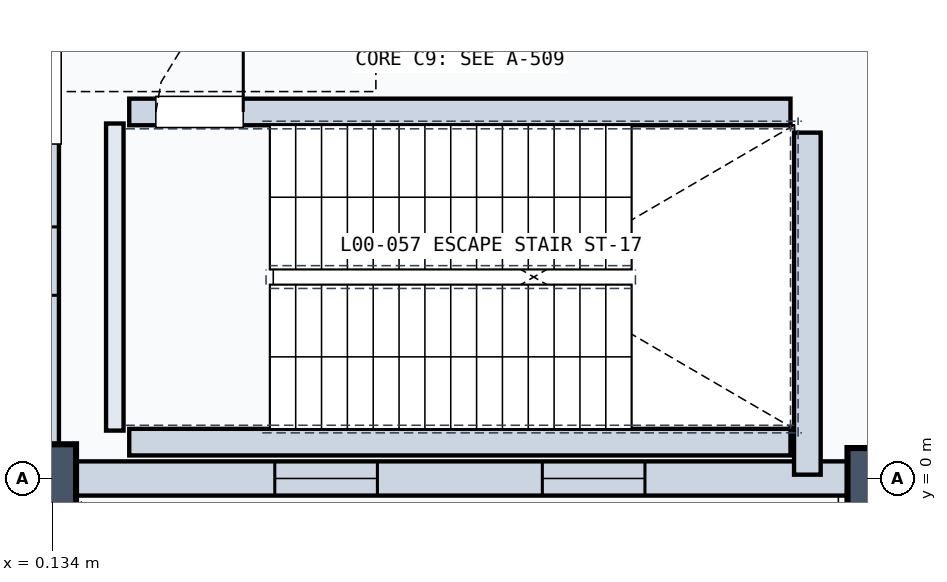
"""IFC4 building model, lengths in metres.
Left out: names, types, materials, properties, quantities, classifications, styles, units other than length and angle.
Written with IfcOpenShell. Run it as: python <this file> out.ifc"""

import sys

from ifc_helpers import new_model, si_unit, direction, frame, frame_2d, origin, origin_with_axes, origin_2d, place, context, subcontext, project, spatial, rectangle, circle, extrude, element, fill, save


model = new_model("IFC4")
c1 = context("Model", 3, precision=1e-05, world=origin(), true_north=direction((0.0, 1.0)))
c2 = subcontext(c1, "Body", "Model", "MODEL_VIEW")
j1 = project(units=[si_unit("LENGTHUNIT", "METRE"), si_unit("PLANEANGLEUNIT", "RADIAN")], contexts=[c1])
p1 = place(None, origin())
s1 = spatial("IfcSite", under=j1, at=p1, CompositionType="ELEMENT")
p2 = place(p1, origin())
s2 = spatial("IfcBuilding", under=s1, at=p2, CompositionType="ELEMENT")
p3 = place(p2, origin())
s3 = spatial("IfcBuildingStorey", under=s2, at=p3, CompositionType="ELEMENT", Elevation=0.0)
p4 = place(p3, origin_with_axes())
e1 = element("IfcColumn", 1, at=p4, inside=s3, PredefinedType="COLUMN", context=c2, shape_type="SweptSolid", body=[
    extrude(circle(Radius=0.45, at=origin_2d()), origin(), (0.0, 0.0, 1.0), 5.4),
])
p5 = place(p3, frame((11.0, 0.0, 0.0), z_axis=(0.0, 0.0, 1.0), x_axis=(1.0, 0.0, 0.0)))
e2 = element("IfcColumn", 2, at=p5, inside=s3, PredefinedType="COLUMN", context=c2, shape_type="SweptSolid", body=[
    extrude(circle(Radius=0.4, at=origin_2d()), origin(), (0.0, 0.0, 1.0), 5.4),
])
p6 = place(p3, frame((0.22, 0.0, 0.0), z_axis=(0.0, 0.0, 1.0), x_axis=(1.0, 0.0, 0.0)))
e3 = element("IfcWall", 3, at=p6, inside=s3, PredefinedType="SOLIDWALL", context=c2, shape_type="SweptSolid", body=[
    extrude(rectangle(XDim=10.56, YDim=0.45, at=frame_2d((5.28, 0.0))), origin(), (0.0, 0.0, 1.0), 4.35),
])
p7 = place(p6, frame((2.845, 0.0, 0.8)))
e4 = element("IfcOpeningElement", 4, at=p7, cuts=e3, PredefinedType="OPENING", context=c2, shape_type="SweptSolid", body=[
    extrude(rectangle(XDim=1.35, YDim=2.1, at=frame_2d((0.675, 1.05))), frame((0.0, 0.235, 0.0), z_axis=(0.0, -1.0, 0.0), x_axis=(1.0, 0.0, 0.0)), (0.0, 0.0, 1.0), 0.47),
])
p8 = place(p6, frame((6.365, 0.0, 0.8)))
e5 = element("IfcOpeningElement", 5, at=p8, cuts=e3, PredefinedType="OPENING", context=c2, shape_type="SweptSolid", body=[
    extrude(rectangle(XDim=1.35, YDim=2.1, at=frame_2d((0.675, 1.05))), frame((0.0, 0.235, 0.0), z_axis=(0.0, -1.0, 0.0), x_axis=(1.0, 0.0, 0.0)), (0.0, 0.0, 1.0), 0.47),
])
p9 = place(p3, frame((0.0, 0.22, 0.0), z_axis=(0.0, 0.0, 1.0), x_axis=(0.0, 1.0, 0.0)))
e6 = element("IfcWall", 6, at=p9, inside=s3, PredefinedType="SOLIDWALL", context=c2, shape_type="SweptSolid", body=[
    extrude(rectangle(XDim=10.56, YDim=0.45, at=frame_2d((5.28, 0.0))), origin(), (0.0, 0.0, 1.0), 4.3),
])
p10 = place(p9, frame((4.18, 0.0, 0.0)))
e7 = element("IfcOpeningElement", 7, at=p10, cuts=e6, PredefinedType="OPENING", context=c2, shape_type="SweptSolid", body=[
    extrude(rectangle(XDim=2.2, YDim=2.35, at=frame_2d((1.1, 1.175))), frame((0.0, 0.235, 0.0), z_axis=(0.0, -1.0, 0.0), x_axis=(1.0, 0.0, 0.0)), (0.0, 0.0, 1.0), 0.47),
])
p11 = place(p9, frame((2.19, 0.0, 0.8)))
e8 = element("IfcOpeningElement", 8, at=p11, cuts=e6, PredefinedType="OPENING", context=c2, shape_type="SweptSolid", body=[
    extrude(rectangle(XDim=0.9, YDim=1.8, at=frame_2d((0.45, 0.9))), frame((0.0, 0.235, 0.0), z_axis=(0.0, -1.0, 0.0), x_axis=(1.0, 0.0, 0.0)), (0.0, 0.0, 1.0), 0.47),
])
p12 = place(p3, frame((0.96, 0.63, 0.0), z_axis=(0.0, 0.0, 1.0), x_axis=(0.0, 1.0, 0.0)))
e9 = element("IfcWall", 9, at=p12, inside=s3, PredefinedType="SOLIDWALL", context=c2, shape_type="SweptSolid", body=[
    extrude(rectangle(XDim=4.04, YDim=0.23, at=frame_2d((2.02, 0.0))), origin(), (0.0, 0.0, 1.0), 5.06),
])
p13 = place(p3, frame((10.072, 0.05, 0.0), z_axis=(0.0, 0.0, 1.0), x_axis=(0.0, 1.0, 0.0)))
e10 = element("IfcWall", 10, at=p13, inside=s3, PredefinedType="SOLIDWALL", context=c2, shape_type="SweptSolid", body=[
    extrude(rectangle(XDim=4.5, YDim=0.35, at=frame_2d((2.25, 0.0))), origin(), (0.0, 0.0, 1.0), 5.06),
])
p14 = place(p3, frame((1.15, 0.478, 0.0), z_axis=(0.0, 0.0, 1.0), x_axis=(1.0, 0.0, 0.0)))
e11 = element("IfcWall", 11, at=p14, inside=s3, PredefinedType="SOLIDWALL", context=c2, shape_type="SweptSolid", body=[
    extrude(rectangle(XDim=8.7, YDim=0.35, at=frame_2d((4.35, 0.0))), origin(), (0.0, 0.0, 1.0), 5.06),
])
p15 = place(p3, frame((1.15, 4.822, 0.0), z_axis=(0.0, 0.0, 1.0), x_axis=(1.0, 0.0, 0.0)))
e12 = element("IfcWall", 12, at=p15, inside=s3, PredefinedType="SOLIDWALL", context=c2, shape_type="SweptSolid", body=[
    extrude(rectangle(XDim=8.7, YDim=0.35, at=frame_2d((4.35, 0.0))), origin(), (0.0, 0.0, 1.0), 5.06),
])
p16 = place(p15, frame((0.35, 0.0, 0.0)))
e13 = element("IfcOpeningElement", 13, at=p16, cuts=e12, PredefinedType="OPENING", context=c2, shape_type="SweptSolid", body=[
    extrude(rectangle(XDim=1.15, YDim=2.2, at=frame_2d((0.575, 1.1))), frame((0.0, 0.185, 0.0), z_axis=(0.0, -1.0, 0.0), x_axis=(1.0, 0.0, 0.0)), (0.0, 0.0, 1.0), 0.37),
])
p17 = place(p7, origin())
e14 = element("IfcWindow", 14, at=p17, inside=s3, PartitioningType="SINGLE_PANEL", PredefinedType="WINDOW", context=c2, shape_type="SweptSolid", body=[
    extrude(rectangle(XDim=1.35, YDim=2.1, at=frame_2d((0.675, 1.05))), frame((0.0, 0.03, 0.0), z_axis=(0.0, -1.0, 0.0), x_axis=(1.0, 0.0, 0.0)), (0.0, 0.0, 1.0), 0.06),
])
fill(e4, e14)
p18 = place(p8, origin())
e15 = element("IfcWindow", 15, at=p18, inside=s3, PartitioningType="SINGLE_PANEL", PredefinedType="WINDOW", context=c2, shape_type="SweptSolid", body=[
    extrude(rectangle(XDim=1.35, YDim=2.1, at=frame_2d((0.675, 1.05))), frame((0.0, 0.03, 0.0), z_axis=(0.0, -1.0, 0.0), x_axis=(1.0, 0.0, 0.0)), (0.0, 0.0, 1.0), 0.06),
])
fill(e5, e15)
p19 = place(p16, origin())
e16 = element("IfcDoor", 16, at=p19, inside=s3, OperationType="SINGLE_SWING_RIGHT", PredefinedType="DOOR", context=c2, shape_type="SweptSolid", body=[
    extrude(rectangle(XDim=1.15, YDim=2.2, at=frame_2d((0.575, 1.1))), frame((0.0, 0.025, 0.0), z_axis=(0.0, -1.0, 0.0), x_axis=(1.0, 0.0, 0.0)), (0.0, 0.0, 1.0), 0.05),
])
fill(e13, e16)
save(model, sys.argv[1])
